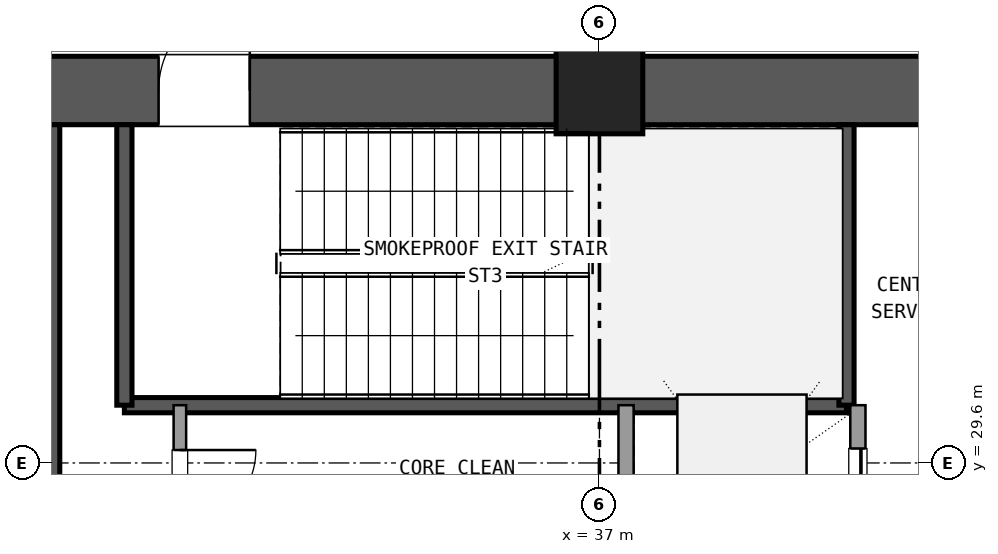
"""IFC4 building model, lengths in metres.
Left out: names, types, materials, properties, quantities, classifications, styles, units other than length and angle.
Written with IfcOpenShell. Run it as: python <this file> out.ifc"""

import sys

from ifc_helpers import new_model, si_unit, direction, frame, frame_2d, origin, origin_2d, place, context, subcontext, project, spatial, rectangle, extrude, element, fill, save


model = new_model("IFC4")
c1 = context("Model", 3, precision=1e-05, world=origin(), true_north=direction((0.0, 1.0)))
c2 = subcontext(c1, "Body", "Model", "MODEL_VIEW")
j1 = project(units=[si_unit("LENGTHUNIT", "METRE"), si_unit("PLANEANGLEUNIT", "RADIAN")], contexts=[c1])
p1 = place(None, origin())
s1 = spatial("IfcSite", under=j1, at=p1, CompositionType="ELEMENT")
p2 = place(p1, origin())
s2 = spatial("IfcBuilding", under=s1, at=p2, CompositionType="ELEMENT")
p3 = place(p2, origin())
s3 = spatial("IfcBuildingStorey", under=s2, at=p3, CompositionType="ELEMENT", Elevation=0.0)
p4 = place(p3, frame((37.0, 34.5, 0.0), z_axis=(0.0, 0.0, 1.0), x_axis=(1.0, 0.0, 0.0)))
e1 = element("IfcColumn", 1, at=p4, inside=s3, PredefinedType="COLUMN", context=c2, shape_type="SweptSolid", body=[
    extrude(rectangle(XDim=1.14, YDim=1.14, at=origin_2d()), origin(), (0.0, 0.0, 1.0), 5.4),
])
p5 = place(p3, frame((47.635, 34.5, 0.0), z_axis=(0.0, 0.0, 1.0), x_axis=(-1.0, 0.0, 0.0)))
e2 = element("IfcWall", 2, at=p5, inside=s3, PredefinedType="SHEAR", context=c2, shape_type="SweptSolid", body=[
    extrude(rectangle(XDim=10.07, YDim=0.9, at=frame_2d((5.035, 0.0))), origin(), (0.0, 0.0, 1.0), 5.1),
])
p6 = place(p5, frame((4.535, 0.0, 0.0)))
e3 = element("IfcOpeningElement", 3, at=p6, cuts=e2, PredefinedType="OPENING", context=c2, shape_type="SweptSolid", body=[
    extrude(rectangle(XDim=1.6, YDim=2.2, at=frame_2d((0.8, 1.1))), frame((0.0, 0.46, 0.0), z_axis=(0.0, -1.0, 0.0), x_axis=(1.0, 0.0, 0.0)), (0.0, 0.0, 1.0), 0.92),
])
p7 = place(p3, frame((36.435, 34.5, 0.0), z_axis=(0.0, 0.0, 1.0), x_axis=(-1.0, 0.0, 0.0)))
e4 = element("IfcWall", 4, at=p7, inside=s3, PredefinedType="SHEAR", context=c2, shape_type="SweptSolid", body=[
    extrude(rectangle(XDim=10.07, YDim=0.9, at=frame_2d((5.035, 0.0))), origin(), (0.0, 0.0, 1.0), 5.1),
])
p8 = place(p7, frame((4.035, 0.0, 0.0)))
e5 = element("IfcOpeningElement", 5, at=p8, cuts=e4, PredefinedType="OPENING", context=c2, shape_type="SweptSolid", body=[
    extrude(rectangle(XDim=1.2, YDim=2.15, at=frame_2d((0.6, 1.075))), frame((0.0, 0.46, 0.0), z_axis=(0.0, -1.0, 0.0), x_axis=(1.0, 0.0, 0.0)), (0.0, 0.0, 1.0), 0.92),
])
p9 = place(p3, frame((29.8, 24.65, 0.0), z_axis=(0.0, 0.0, 1.0), x_axis=(0.0, 1.0, 0.0)))
e6 = element("IfcWall", 6, at=p9, inside=s3, PredefinedType="SHEAR", context=c2, shape_type="SweptSolid", body=[
    extrude(rectangle(XDim=9.4, YDim=0.2, at=frame_2d((4.7, 0.0))), origin(), (0.0, 0.0, 1.0), 5.1),
])
p10 = place(p3, frame((30.75, 30.36, 0.0), z_axis=(0.0, 0.0, 1.0), x_axis=(1.0, 0.0, 0.0)))
e7 = element("IfcWall", 7, at=p10, inside=s3, PredefinedType="SHEAR", context=c2, shape_type="SweptSolid", body=[
    extrude(rectangle(XDim=9.5, YDim=0.2, at=frame_2d((4.75, 0.0))), origin(), (0.0, 0.0, 1.0), 5.1),
])
for number, where, z_axis, x_axis in (
    (8, (30.75, 30.36, 0.0), (0.0, 0.0, 1.0), (0.0, 1.0, 0.0)),
    (9, (40.25, 30.36, 0.0), (0.0, 0.0, 1.0), (0.0, 1.0, 0.0)),
):
    element("IfcWall", number, at=place(p3, frame(where, z_axis=z_axis, x_axis=x_axis)), inside=s3, PredefinedType="SHEAR", context=c2, shape_type="SweptSolid", body=[
        extrude(rectangle(XDim=3.69, YDim=0.2, at=frame_2d((1.845, 0.0))), origin(), (0.0, 0.0, 1.0), 5.1),
    ])
p11 = place(p3, frame((37.35, 23.54, 0.0), z_axis=(0.0, 0.0, 1.0), x_axis=(0.0, 1.0, 0.0)))
e10 = element("IfcWall", 10, at=p11, inside=s3, PredefinedType="SOLIDWALL", context=c2, shape_type="SweptSolid", body=[
    extrude(rectangle(XDim=6.82, YDim=0.2, at=frame_2d((3.41, 0.0))), origin(), (0.0, 0.0, 1.0), 4.11),
])
p12 = place(p3, frame((40.4, 23.54, 0.0), z_axis=(0.0, 0.0, 1.0), x_axis=(0.0, 1.0, 0.0)))
e11 = element("IfcWall", 11, at=p12, inside=s3, PredefinedType="SOLIDWALL", context=c2, shape_type="SweptSolid", body=[
    extrude(rectangle(XDim=6.82, YDim=0.2, at=frame_2d((3.41, 0.0))), origin(), (0.0, 0.0, 1.0), 4.11),
])
p13 = place(p12, frame((0.35, 0.0, 0.0)))
e12 = element("IfcOpeningElement", 12, at=p13, cuts=e11, PredefinedType="OPENING", context=c2, shape_type="SweptSolid", body=[
    extrude(rectangle(XDim=1.4, YDim=2.2, at=frame_2d((0.7, 1.1))), frame((0.0, 0.11, 0.0), z_axis=(0.0, -1.0, 0.0), x_axis=(1.0, 0.0, 0.0)), (0.0, 0.0, 1.0), 0.22),
])
p14 = place(p12, frame((2.65, 0.0, 0.0)))
e13 = element("IfcOpeningElement", 13, at=p14, cuts=e11, PredefinedType="OPENING", context=c2, shape_type="SweptSolid", body=[
    extrude(rectangle(XDim=1.4, YDim=2.2, at=frame_2d((0.7, 1.1))), frame((0.0, 0.11, 0.0), z_axis=(0.0, -1.0, 0.0), x_axis=(1.0, 0.0, 0.0)), (0.0, 0.0, 1.0), 0.22),
])
p15 = place(p12, frame((4.85, 0.0, 0.0)))
e14 = element("IfcOpeningElement", 14, at=p15, cuts=e11, PredefinedType="OPENING", context=c2, shape_type="SweptSolid", body=[
    extrude(rectangle(XDim=1.4, YDim=2.2, at=frame_2d((0.7, 1.1))), frame((0.0, 0.11, 0.0), z_axis=(0.0, -1.0, 0.0), x_axis=(1.0, 0.0, 0.0)), (0.0, 0.0, 1.0), 0.22),
])
p16 = place(p3, frame((31.48, 26.32, 0.0), z_axis=(0.0, 0.0, 1.0), x_axis=(0.0, 1.0, 0.0)))
e15 = element("IfcWall", 15, at=p16, inside=s3, PredefinedType="PLUMBINGWALL", context=c2, shape_type="SweptSolid", body=[
    extrude(rectangle(XDim=4.04, YDim=0.165, at=frame_2d((2.02, 0.0))), origin(), (0.0, 0.0, 1.0), 4.11),
])
p17 = place(p16, frame((0.5, 0.0, 0.0)))
e16 = element("IfcOpeningElement", 16, at=p17, cuts=e15, PredefinedType="OPENING", context=c2, shape_type="SweptSolid", body=[
    extrude(rectangle(XDim=0.95, YDim=2.1, at=frame_2d((0.475, 1.05))), frame((0.0, 0.093, 0.0), z_axis=(0.0, -1.0, 0.0), x_axis=(1.0, 0.0, 0.0)), (0.0, 0.0, 1.0), 0.185),
])
p18 = place(p16, frame((2.45, 0.0, 0.0)))
e17 = element("IfcOpeningElement", 17, at=p18, cuts=e15, PredefinedType="OPENING", context=c2, shape_type="SweptSolid", body=[
    extrude(rectangle(XDim=1.0, YDim=2.15, at=frame_2d((0.5, 1.075))), frame((0.0, 0.093, 0.0), z_axis=(0.0, -1.0, 0.0), x_axis=(1.0, 0.0, 0.0)), (0.0, 0.0, 1.0), 0.185),
])
p19 = place(p8, frame((1.2, 0.0, 0.0), z_axis=(0.0, 0.0, 1.0), x_axis=(-1.0, 0.0, 0.0)))
e18 = element("IfcDoor", 18, at=p19, inside=s3, OperationType="SINGLE_SWING_LEFT", PredefinedType="DOOR", context=c2, shape_type="SweptSolid", body=[
    extrude(rectangle(XDim=1.2, YDim=2.15, at=frame_2d((0.6, 1.075))), frame((0.0, 0.025, 0.0), z_axis=(0.0, -1.0, 0.0), x_axis=(1.0, 0.0, 0.0)), (0.0, 0.0, 1.0), 0.05),
])
fill(e5, e18)
p20 = place(p15, origin())
e19 = element("IfcDoor", 19, at=p20, inside=s3, OperationType="SLIDING_TO_RIGHT", PredefinedType="DOOR", context=c2, shape_type="SweptSolid", body=[
    extrude(rectangle(XDim=1.4, YDim=2.2, at=frame_2d((0.7, 1.1))), frame((0.0, 0.025, 0.0), z_axis=(0.0, -1.0, 0.0), x_axis=(1.0, 0.0, 0.0)), (0.0, 0.0, 1.0), 0.05),
])
fill(e14, e19)
p21 = place(p18, frame((1.0, 0.0, 0.0), z_axis=(0.0, 0.0, 1.0), x_axis=(-1.0, 0.0, 0.0)))
e20 = element("IfcDoor", 20, at=p21, inside=s3, OperationType="SINGLE_SWING_RIGHT", PredefinedType="DOOR", context=c2, shape_type="SweptSolid", body=[
    extrude(rectangle(XDim=1.0, YDim=2.15, at=frame_2d((0.5, 1.075))), frame((0.0, 0.025, 0.0), z_axis=(0.0, -1.0, 0.0), x_axis=(1.0, 0.0, 0.0)), (0.0, 0.0, 1.0), 0.05),
])
fill(e17, e20)
save(model, sys.argv[1])
